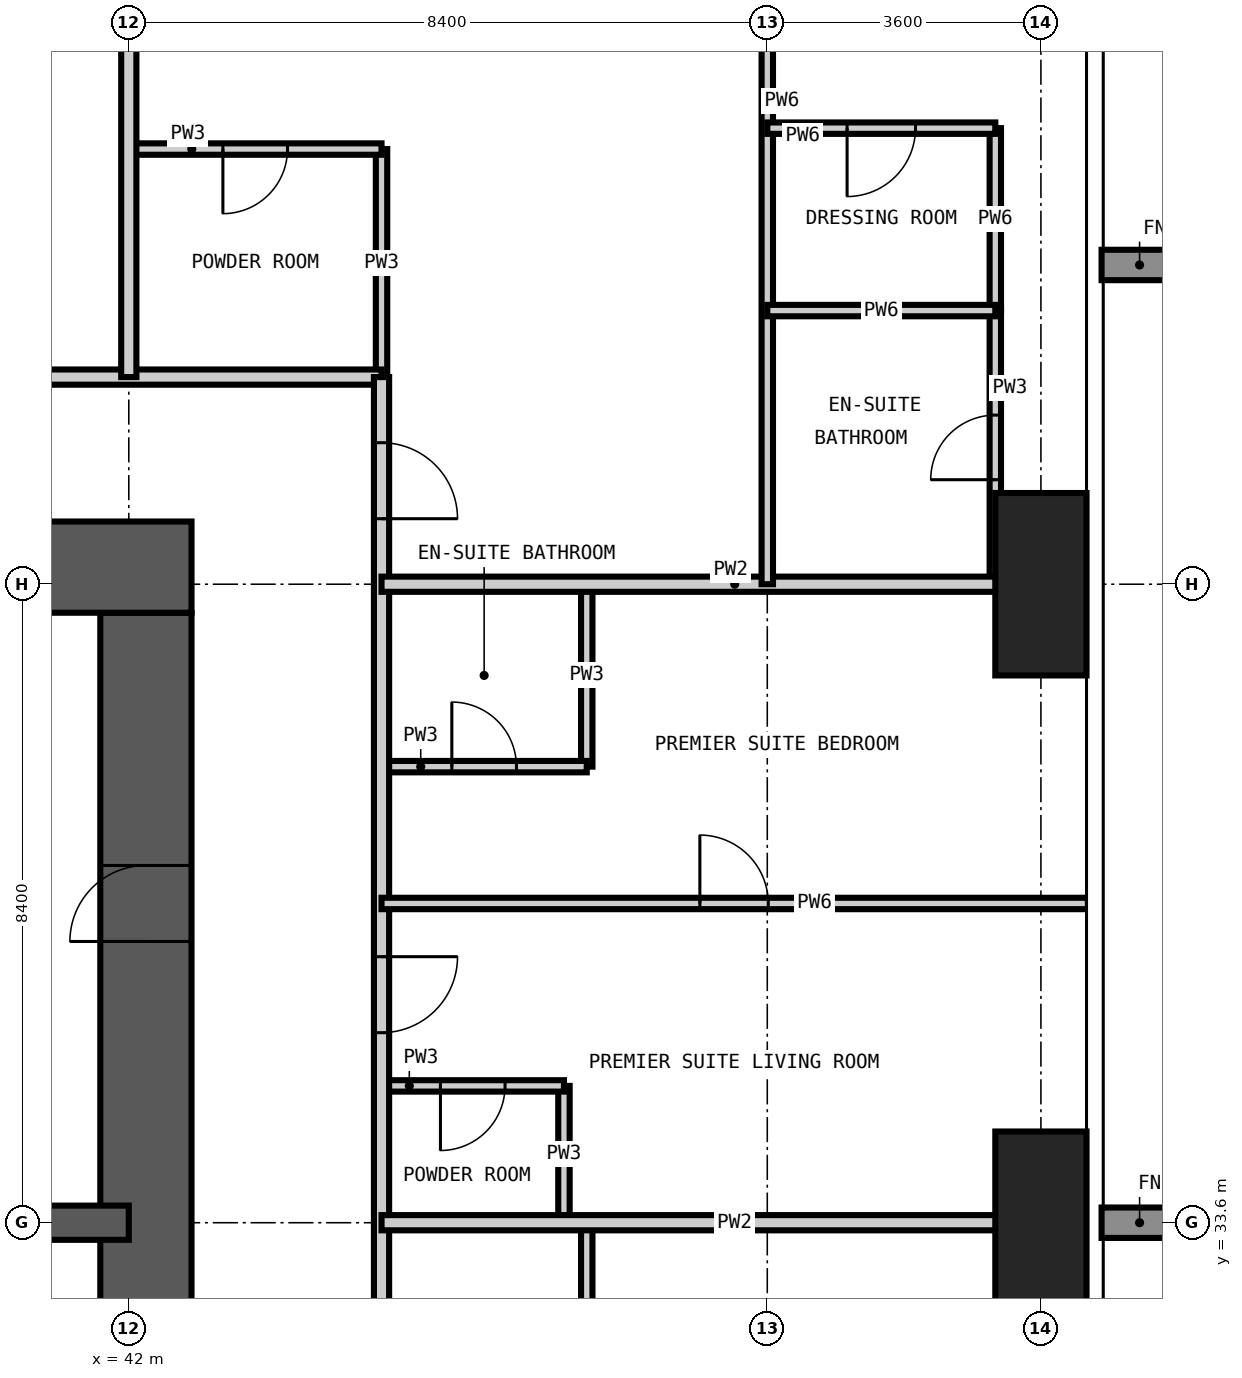
"""IFC4 building model, lengths in metres.
Left out: names, types, materials, properties, quantities, classifications, styles, units other than length and angle.
Written with IfcOpenShell. Run it as: python <this file> out.ifc"""

import sys

from ifc_helpers import new_model, si_unit, direction, frame, frame_2d, origin, origin_2d, place, context, subcontext, project, spatial, rectangle, extrude, element, fill, save


model = new_model("IFC4")
c1 = context("Model", 3, precision=1e-05, world=origin(), true_north=direction((0.0, 1.0)))
c2 = subcontext(c1, "Body", "Model", "MODEL_VIEW")
j1 = project(units=[si_unit("LENGTHUNIT", "METRE"), si_unit("PLANEANGLEUNIT", "RADIAN")], contexts=[c1])
p1 = place(None, origin())
s1 = spatial("IfcSite", under=j1, at=p1, CompositionType="ELEMENT")
p2 = place(p1, origin())
s2 = spatial("IfcBuilding", under=s1, at=p2, CompositionType="ELEMENT")
p3 = place(p2, frame((0.0, 0.0, 111.6)))
s3 = spatial("IfcBuildingStorey", under=s2, at=p3, CompositionType="ELEMENT", Elevation=111.6)
for number, where, z_axis, x_axis in (
    (1, (54.0, 33.6, -0.35), (0.0, 0.0, 1.0), (1.0, 0.0, 0.0)),
    (2, (54.0, 42.0, -0.35), (0.0, 0.0, 1.0), (1.0, 0.0, 0.0)),
):
    element("IfcColumn", number, at=place(p3, frame(where, z_axis=z_axis, x_axis=x_axis)), inside=s3, PredefinedType="COLUMN", context=c2, shape_type="SweptSolid", body=[
        extrude(rectangle(XDim=1.2, YDim=2.4, at=origin_2d()), origin(), (0.0, 0.0, 1.0), 3.6),
    ])
p4 = place(p3, frame((42.225, 17.175, -0.35), z_axis=(0.0, 0.0, 1.0), x_axis=(0.0, 1.0, 0.0)))
e3 = element("IfcWall", 3, at=p4, inside=s3, PredefinedType="SHEAR", context=c2, shape_type="SweptSolid", body=[
    extrude(rectangle(XDim=24.45, YDim=1.2, at=frame_2d((12.225, 0.0))), origin(), (0.0, 0.0, 1.0), 3.6),
])
p5 = place(p4, frame((0.425, 0.0, 0.35)))
e4 = element("IfcOpeningElement", 4, at=p5, cuts=e3, PredefinedType="OPENING", context=c2, shape_type="SweptSolid", body=[
    extrude(rectangle(XDim=1.2, YDim=2.2, at=frame_2d((0.6, 1.1))), frame((0.0, 0.61, 0.0), z_axis=(0.0, -1.0, 0.0), x_axis=(1.0, 0.0, 0.0)), (0.0, 0.0, 1.0), 1.22),
])
p6 = place(p4, frame((11.325, 0.0, 0.35)))
e5 = element("IfcOpeningElement", 5, at=p6, cuts=e3, PredefinedType="OPENING", context=c2, shape_type="SweptSolid", body=[
    extrude(rectangle(XDim=1.8, YDim=2.2, at=frame_2d((0.9, 1.1))), frame((0.0, 0.61, 0.0), z_axis=(0.0, -1.0, 0.0), x_axis=(1.0, 0.0, 0.0)), (0.0, 0.0, 1.0), 1.22),
])
p7 = place(p4, frame((20.125, 0.0, 0.35)))
e6 = element("IfcOpeningElement", 6, at=p7, cuts=e3, PredefinedType="OPENING", context=c2, shape_type="SweptSolid", body=[
    extrude(rectangle(XDim=1.0, YDim=2.1, at=frame_2d((0.5, 1.05))), frame((0.0, 0.61, 0.0), z_axis=(0.0, -1.0, 0.0), x_axis=(1.0, 0.0, 0.0)), (0.0, 0.0, 1.0), 1.22),
])
p8 = place(p3, frame((42.825, 42.225, -0.35), z_axis=(0.0, 0.0, 1.0), x_axis=(-1.0, 0.0, 0.0)))
e7 = element("IfcWall", 7, at=p8, inside=s3, PredefinedType="SHEAR", context=c2, shape_type="SweptSolid", body=[
    extrude(rectangle(XDim=26.85, YDim=1.2, at=frame_2d((13.425, 0.0))), origin(), (0.0, 0.0, 1.0), 3.6),
])
p9 = place(p8, frame((21.325, 0.0, 0.35)))
e8 = element("IfcOpeningElement", 8, at=p9, cuts=e7, PredefinedType="OPENING", context=c2, shape_type="SweptSolid", body=[
    extrude(rectangle(XDim=1.0, YDim=2.1, at=frame_2d((0.5, 1.05))), frame((0.0, 0.61, 0.0), z_axis=(0.0, -1.0, 0.0), x_axis=(1.0, 0.0, 0.0)), (0.0, 0.0, 1.0), 1.22),
])
p10 = place(p8, frame((10.725, 0.0, 0.35)))
e9 = element("IfcOpeningElement", 9, at=p10, cuts=e7, PredefinedType="OPENING", context=c2, shape_type="SweptSolid", body=[
    extrude(rectangle(XDim=1.2, YDim=2.2, at=frame_2d((0.6, 1.1))), frame((0.0, 0.61, 0.0), z_axis=(0.0, -1.0, 0.0), x_axis=(1.0, 0.0, 0.0)), (0.0, 0.0, 1.0), 1.22),
])
p11 = place(p3, frame((16.8, 33.6, -0.35), z_axis=(0.0, 0.0, 1.0), x_axis=(1.0, 0.0, 0.0)))
e10 = element("IfcWall", 10, at=p11, inside=s3, PredefinedType="SHEAR", context=c2, shape_type="SweptSolid", body=[
    extrude(rectangle(XDim=25.2, YDim=0.45, at=frame_2d((12.6, 0.0))), origin(), (0.0, 0.0, 1.0), 3.6),
])
p12 = place(p11, frame((22.6, 0.0, 0.35)))
e11 = element("IfcOpeningElement", 11, at=p12, cuts=e10, PredefinedType="OPENING", context=c2, shape_type="SweptSolid", body=[
    extrude(rectangle(XDim=1.0, YDim=2.1, at=frame_2d((0.5, 1.05))), frame((0.0, 0.235, 0.0), z_axis=(0.0, -1.0, 0.0), x_axis=(1.0, 0.0, 0.0)), (0.0, 0.0, 1.0), 0.47),
])
p13 = place(p3, frame((45.325, 44.725, 0.0), z_axis=(0.0, 0.0, 1.0), x_axis=(0.0, 1.0, 0.0)))
e12 = element("IfcWall", 12, at=p13, inside=s3, PredefinedType="PARTITIONING", context=c2, shape_type="SweptSolid", body=[
    extrude(rectangle(XDim=3.0, YDim=0.15, at=frame_2d((1.5, 0.0))), origin(), (0.0, 0.0, 1.0), 3.25),
])
p14 = place(p3, frame((47.725, 33.6, 0.0), z_axis=(0.0, 0.0, 1.0), x_axis=(0.0, 1.0, 0.0)))
e13 = element("IfcWall", 13, at=p14, inside=s3, PredefinedType="PARTITIONING", context=c2, shape_type="SweptSolid", body=[
    extrude(rectangle(XDim=1.8, YDim=0.15, at=frame_2d((0.9, 0.0))), origin(), (0.0, 0.0, 1.0), 3.25),
])
p15 = place(p3, frame((48.025, 31.2, 0.0), z_axis=(0.0, 0.0, 1.0), x_axis=(0.0, 1.0, 0.0)))
e14 = element("IfcWall", 14, at=p15, inside=s3, PredefinedType="PARTITIONING", context=c2, shape_type="SweptSolid", body=[
    extrude(rectangle(XDim=2.4, YDim=0.15, at=frame_2d((1.2, 0.0))), origin(), (0.0, 0.0, 1.0), 3.25),
])
p16 = place(p3, frame((48.025, 39.6, 0.0), z_axis=(0.0, 0.0, 1.0), x_axis=(0.0, 1.0, 0.0)))
e15 = element("IfcWall", 15, at=p16, inside=s3, PredefinedType="PARTITIONING", context=c2, shape_type="SweptSolid", body=[
    extrude(rectangle(XDim=2.4, YDim=0.15, at=frame_2d((1.2, 0.0))), origin(), (0.0, 0.0, 1.0), 3.25),
])
p17 = place(p3, frame((53.4, 42.0, 0.0), z_axis=(0.0, 0.0, 1.0), x_axis=(0.0, 1.0, 0.0)))
e16 = element("IfcWall", 16, at=p17, inside=s3, PredefinedType="PARTITIONING", context=c2, shape_type="SweptSolid", body=[
    extrude(rectangle(XDim=3.6, YDim=0.15, at=frame_2d((1.8, 0.0))), origin(), (0.0, 0.0, 1.0), 3.25),
])
p18 = place(p17, frame((1.375, 0.0, 0.0)))
e17 = element("IfcOpeningElement", 17, at=p18, cuts=e16, PredefinedType="OPENING", context=c2, shape_type="SweptSolid", body=[
    extrude(rectangle(XDim=0.85, YDim=2.1, at=frame_2d((0.425, 1.05))), frame((0.0, 0.085, 0.0), z_axis=(0.0, -1.0, 0.0), x_axis=(1.0, 0.0, 0.0)), (0.0, 0.0, 1.0), 0.17),
])
p19 = place(p3, frame((45.325, 35.4, 0.0), z_axis=(0.0, 0.0, 1.0), x_axis=(1.0, 0.0, 0.0)))
e18 = element("IfcWall", 18, at=p19, inside=s3, PredefinedType="PARTITIONING", context=c2, shape_type="SweptSolid", body=[
    extrude(rectangle(XDim=2.4, YDim=0.15, at=frame_2d((1.2, 0.0))), origin(), (0.0, 0.0, 1.0), 3.25),
])
p20 = place(p19, frame((0.775, 0.0, 0.0)))
e19 = element("IfcOpeningElement", 19, at=p20, cuts=e18, PredefinedType="OPENING", context=c2, shape_type="SweptSolid", body=[
    extrude(rectangle(XDim=0.85, YDim=2.1, at=frame_2d((0.425, 1.05))), frame((0.0, 0.085, 0.0), z_axis=(0.0, -1.0, 0.0), x_axis=(1.0, 0.0, 0.0)), (0.0, 0.0, 1.0), 0.17),
])
p21 = place(p3, frame((45.325, 39.6, 0.0), z_axis=(0.0, 0.0, 1.0), x_axis=(1.0, 0.0, 0.0)))
e20 = element("IfcWall", 20, at=p21, inside=s3, PredefinedType="PARTITIONING", context=c2, shape_type="SweptSolid", body=[
    extrude(rectangle(XDim=2.7, YDim=0.15, at=frame_2d((1.35, 0.0))), origin(), (0.0, 0.0, 1.0), 3.25),
])
p22 = place(p21, frame((0.925, 0.0, 0.0)))
e21 = element("IfcOpeningElement", 21, at=p22, cuts=e20, PredefinedType="OPENING", context=c2, shape_type="SweptSolid", body=[
    extrude(rectangle(XDim=0.85, YDim=2.1, at=frame_2d((0.425, 1.05))), frame((0.0, 0.085, 0.0), z_axis=(0.0, -1.0, 0.0), x_axis=(1.0, 0.0, 0.0)), (0.0, 0.0, 1.0), 0.17),
])
p23 = place(p3, frame((42.0, 47.725, 0.0), z_axis=(0.0, 0.0, 1.0), x_axis=(1.0, 0.0, 0.0)))
e22 = element("IfcWall", 22, at=p23, inside=s3, PredefinedType="PARTITIONING", context=c2, shape_type="SweptSolid", body=[
    extrude(rectangle(XDim=3.325, YDim=0.15, at=frame_2d((1.663, 0.0))), origin(), (0.0, 0.0, 1.0), 3.25),
])
p24 = place(p23, frame((1.238, 0.0, 0.0)))
e23 = element("IfcOpeningElement", 23, at=p24, cuts=e22, PredefinedType="OPENING", context=c2, shape_type="SweptSolid", body=[
    extrude(rectangle(XDim=0.85, YDim=2.1, at=frame_2d((0.425, 1.05))), frame((0.0, 0.085, 0.0), z_axis=(0.0, -1.0, 0.0), x_axis=(1.0, 0.0, 0.0)), (0.0, 0.0, 1.0), 0.17),
])
p25 = place(p3, frame((12.6, 44.725, 0.0), z_axis=(0.0, 0.0, 1.0), x_axis=(1.0, 0.0, 0.0)))
e24 = element("IfcWall", 24, at=p25, inside=s3, PredefinedType="PARTITIONING", context=c2, shape_type="SweptSolid", body=[
    extrude(rectangle(XDim=32.725, YDim=0.2, at=frame_2d((16.362, 0.0))), origin(), (0.0, 0.0, 1.0), 3.25),
])
p26 = place(p25, frame((9.1, 0.0, 0.0)))
e25 = element("IfcOpeningElement", 25, at=p26, cuts=e24, PredefinedType="OPENING", context=c2, shape_type="SweptSolid", body=[
    extrude(rectangle(XDim=1.0, YDim=2.2, at=frame_2d((0.5, 1.1))), frame((0.0, 0.11, 0.0), z_axis=(0.0, -1.0, 0.0), x_axis=(1.0, 0.0, 0.0)), (0.0, 0.0, 1.0), 0.22),
])
p27 = place(p25, frame((17.5, 0.0, 0.0)))
e26 = element("IfcOpeningElement", 26, at=p27, cuts=e24, PredefinedType="OPENING", context=c2, shape_type="SweptSolid", body=[
    extrude(rectangle(XDim=1.0, YDim=2.2, at=frame_2d((0.5, 1.1))), frame((0.0, 0.11, 0.0), z_axis=(0.0, -1.0, 0.0), x_axis=(1.0, 0.0, 0.0)), (0.0, 0.0, 1.0), 0.22),
])
p28 = place(p25, frame((25.9, 0.0, 0.0)))
e27 = element("IfcOpeningElement", 27, at=p28, cuts=e24, PredefinedType="OPENING", context=c2, shape_type="SweptSolid", body=[
    extrude(rectangle(XDim=1.0, YDim=2.2, at=frame_2d((0.5, 1.1))), frame((0.0, 0.11, 0.0), z_axis=(0.0, -1.0, 0.0), x_axis=(1.0, 0.0, 0.0)), (0.0, 0.0, 1.0), 0.22),
])
p29 = place(p3, frame((45.325, 44.725, 0.0), z_axis=(0.0, 0.0, 1.0), x_axis=(0.0, -1.0, 0.0)))
e28 = element("IfcWall", 28, at=p29, inside=s3, PredefinedType="PARTITIONING", context=c2, shape_type="SweptSolid", body=[
    extrude(rectangle(XDim=31.85, YDim=0.2, at=frame_2d((15.925, 0.0))), origin(), (0.0, 0.0, 1.0), 3.25),
])
p30 = place(p29, frame((24.425, 0.0, 0.0)))
e29 = element("IfcOpeningElement", 29, at=p30, cuts=e28, PredefinedType="OPENING", context=c2, shape_type="SweptSolid", body=[
    extrude(rectangle(XDim=1.0, YDim=2.2, at=frame_2d((0.5, 1.1))), frame((0.0, 0.11, 0.0), z_axis=(0.0, -1.0, 0.0), x_axis=(1.0, 0.0, 0.0)), (0.0, 0.0, 1.0), 0.22),
])
p31 = place(p29, frame((16.025, 0.0, 0.0)))
e30 = element("IfcOpeningElement", 30, at=p31, cuts=e28, PredefinedType="OPENING", context=c2, shape_type="SweptSolid", body=[
    extrude(rectangle(XDim=1.0, YDim=2.2, at=frame_2d((0.5, 1.1))), frame((0.0, 0.11, 0.0), z_axis=(0.0, -1.0, 0.0), x_axis=(1.0, 0.0, 0.0)), (0.0, 0.0, 1.0), 0.22),
])
p32 = place(p29, frame((7.625, 0.0, 0.0)))
e31 = element("IfcOpeningElement", 31, at=p32, cuts=e28, PredefinedType="OPENING", context=c2, shape_type="SweptSolid", body=[
    extrude(rectangle(XDim=1.0, YDim=2.2, at=frame_2d((0.5, 1.1))), frame((0.0, 0.11, 0.0), z_axis=(0.0, -1.0, 0.0), x_axis=(1.0, 0.0, 0.0)), (0.0, 0.0, 1.0), 0.22),
])
p33 = place(p29, frame((29.387, 0.0, 0.0)))
e32 = element("IfcOpeningElement", 32, at=p33, cuts=e28, PredefinedType="OPENING", context=c2, shape_type="SweptSolid", body=[
    extrude(rectangle(XDim=1.0, YDim=2.2, at=frame_2d((0.5, 1.1))), frame((0.0, 0.11, 0.0), z_axis=(0.0, -1.0, 0.0), x_axis=(1.0, 0.0, 0.0)), (0.0, 0.0, 1.0), 0.22),
])
p34 = place(p29, frame((0.863, 0.0, 0.0)))
e33 = element("IfcOpeningElement", 33, at=p34, cuts=e28, PredefinedType="OPENING", context=c2, shape_type="SweptSolid", body=[
    extrude(rectangle(XDim=1.0, YDim=2.2, at=frame_2d((0.5, 1.1))), frame((0.0, 0.11, 0.0), z_axis=(0.0, -1.0, 0.0), x_axis=(1.0, 0.0, 0.0)), (0.0, 0.0, 1.0), 0.22),
])
p35 = place(p3, frame((42.0, 44.725, 0.0), z_axis=(0.0, 0.0, 1.0), x_axis=(0.0, 1.0, 0.0)))
e34 = element("IfcWall", 34, at=p35, inside=s3, PredefinedType="PARTITIONING", context=c2, shape_type="SweptSolid", body=[
    extrude(rectangle(XDim=9.893, YDim=0.2, at=frame_2d((4.946, 0.0))), origin(), (0.0, 0.0, 1.0), 3.25),
])
for number, where, z_axis, x_axis in (
    (35, (45.325, 33.6, 0.0), (0.0, 0.0, 1.0), (1.0, 0.0, 0.0)),
    (36, (45.325, 42.0, 0.0), (0.0, 0.0, 1.0), (1.0, 0.0, 0.0)),
):
    element("IfcWall", number, at=place(p3, frame(where, z_axis=z_axis, x_axis=x_axis)), inside=s3, PredefinedType="PARTITIONING", context=c2, shape_type="SweptSolid", body=[
        extrude(rectangle(XDim=9.293, YDim=0.2, at=frame_2d((4.646, 0.0))), origin(), (0.0, 0.0, 1.0), 3.25),
    ])
p36 = place(p3, frame((50.4, 42.0, 0.0), z_axis=(0.0, 0.0, 1.0), x_axis=(0.0, 1.0, 0.0)))
e37 = element("IfcWall", 37, at=p36, inside=s3, PredefinedType="PARTITIONING", context=c2, shape_type="SweptSolid", body=[
    extrude(rectangle(XDim=12.618, YDim=0.15, at=frame_2d((6.309, 0.0))), origin(), (0.0, 0.0, 1.0), 3.25),
])
p37 = place(p36, frame((8.85, 0.0, 0.0)))
e38 = element("IfcOpeningElement", 38, at=p37, cuts=e37, PredefinedType="OPENING", context=c2, shape_type="SweptSolid", body=[
    extrude(rectangle(XDim=0.9, YDim=2.1, at=frame_2d((0.45, 1.05))), frame((0.0, 0.085, 0.0), z_axis=(0.0, -1.0, 0.0), x_axis=(1.0, 0.0, 0.0)), (0.0, 0.0, 1.0), 0.17),
])
p38 = place(p3, frame((53.4, 45.6, 0.0), z_axis=(0.0, 0.0, 1.0), x_axis=(0.0, 1.0, 0.0)))
e39 = element("IfcWall", 39, at=p38, inside=s3, PredefinedType="PARTITIONING", context=c2, shape_type="SweptSolid", body=[
    extrude(rectangle(XDim=2.4, YDim=0.15, at=frame_2d((1.2, 0.0))), origin(), (0.0, 0.0, 1.0), 3.25),
])
p39 = place(p3, frame((45.325, 37.8, 0.0), z_axis=(0.0, 0.0, 1.0), x_axis=(1.0, 0.0, 0.0)))
e40 = element("IfcWall", 40, at=p39, inside=s3, PredefinedType="PARTITIONING", context=c2, shape_type="SweptSolid", body=[
    extrude(rectangle(XDim=9.293, YDim=0.15, at=frame_2d((4.646, 0.0))), origin(), (0.0, 0.0, 1.0), 3.25),
])
p40 = place(p39, frame((4.188, 0.0, 0.0)))
e41 = element("IfcOpeningElement", 41, at=p40, cuts=e40, PredefinedType="OPENING", context=c2, shape_type="SweptSolid", body=[
    extrude(rectangle(XDim=0.9, YDim=2.1, at=frame_2d((0.45, 1.05))), frame((0.0, 0.085, 0.0), z_axis=(0.0, -1.0, 0.0), x_axis=(1.0, 0.0, 0.0)), (0.0, 0.0, 1.0), 0.17),
])
p41 = place(p3, frame((50.4, 45.6, 0.0), z_axis=(0.0, 0.0, 1.0), x_axis=(1.0, 0.0, 0.0)))
e42 = element("IfcWall", 42, at=p41, inside=s3, PredefinedType="PARTITIONING", context=c2, shape_type="SweptSolid", body=[
    extrude(rectangle(XDim=3.0, YDim=0.15, at=frame_2d((1.5, 0.0))), origin(), (0.0, 0.0, 1.0), 3.25),
])
p42 = place(p3, frame((50.4, 48.0, 0.0), z_axis=(0.0, 0.0, 1.0), x_axis=(1.0, 0.0, 0.0)))
e43 = element("IfcWall", 43, at=p42, inside=s3, PredefinedType="PARTITIONING", context=c2, shape_type="SweptSolid", body=[
    extrude(rectangle(XDim=3.0, YDim=0.15, at=frame_2d((1.5, 0.0))), origin(), (0.0, 0.0, 1.0), 3.25),
])
p43 = place(p42, frame((1.05, 0.0, 0.0)))
e44 = element("IfcOpeningElement", 44, at=p43, cuts=e43, PredefinedType="OPENING", context=c2, shape_type="SweptSolid", body=[
    extrude(rectangle(XDim=0.9, YDim=2.1, at=frame_2d((0.45, 1.05))), frame((0.0, 0.085, 0.0), z_axis=(0.0, -1.0, 0.0), x_axis=(1.0, 0.0, 0.0)), (0.0, 0.0, 1.0), 0.17),
])
p44 = place(p32, origin())
e45 = element("IfcDoor", 45, at=p44, inside=s3, OperationType="SINGLE_SWING_LEFT", PredefinedType="DOOR", context=c2, shape_type="SweptSolid", body=[
    extrude(rectangle(XDim=1.0, YDim=2.2, at=frame_2d((0.5, 1.1))), frame((0.0, 0.025, 0.0), z_axis=(0.0, -1.0, 0.0), x_axis=(1.0, 0.0, 0.0)), (0.0, 0.0, 1.0), 0.05),
])
fill(e31, e45)
p45 = place(p20, frame((0.85, 0.0, 0.0), z_axis=(0.0, 0.0, 1.0), x_axis=(-1.0, 0.0, 0.0)))
e46 = element("IfcDoor", 46, at=p45, inside=s3, OperationType="SINGLE_SWING_RIGHT", PredefinedType="DOOR", context=c2, shape_type="SweptSolid", body=[
    extrude(rectangle(XDim=0.85, YDim=2.1, at=frame_2d((0.425, 1.05))), frame((0.0, 0.025, 0.0), z_axis=(0.0, -1.0, 0.0), x_axis=(1.0, 0.0, 0.0)), (0.0, 0.0, 1.0), 0.05),
])
fill(e19, e46)
p46 = place(p40, origin())
e47 = element("IfcDoor", 47, at=p46, inside=s3, OperationType="SINGLE_SWING_LEFT", PredefinedType="DOOR", context=c2, shape_type="SweptSolid", body=[
    extrude(rectangle(XDim=0.9, YDim=2.1, at=frame_2d((0.45, 1.05))), frame((0.0, 0.025, 0.0), z_axis=(0.0, -1.0, 0.0), x_axis=(1.0, 0.0, 0.0)), (0.0, 0.0, 1.0), 0.05),
])
fill(e41, e47)
p47 = place(p22, origin())
e48 = element("IfcDoor", 48, at=p47, inside=s3, OperationType="SINGLE_SWING_LEFT", PredefinedType="DOOR", context=c2, shape_type="SweptSolid", body=[
    extrude(rectangle(XDim=0.85, YDim=2.1, at=frame_2d((0.425, 1.05))), frame((0.0, 0.025, 0.0), z_axis=(0.0, -1.0, 0.0), x_axis=(1.0, 0.0, 0.0)), (0.0, 0.0, 1.0), 0.05),
])
fill(e21, e48)
p48 = place(p34, origin())
e49 = element("IfcDoor", 49, at=p48, inside=s3, OperationType="SINGLE_SWING_RIGHT", PredefinedType="DOOR", context=c2, shape_type="SweptSolid", body=[
    extrude(rectangle(XDim=1.0, YDim=2.2, at=frame_2d((0.5, 1.1))), frame((0.0, 0.025, 0.0), z_axis=(0.0, -1.0, 0.0), x_axis=(1.0, 0.0, 0.0)), (0.0, 0.0, 1.0), 0.05),
])
fill(e33, e49)
p49 = place(p24, frame((0.85, 0.0, 0.0), z_axis=(0.0, 0.0, 1.0), x_axis=(-1.0, 0.0, 0.0)))
e50 = element("IfcDoor", 50, at=p49, inside=s3, OperationType="SINGLE_SWING_RIGHT", PredefinedType="DOOR", context=c2, shape_type="SweptSolid", body=[
    extrude(rectangle(XDim=0.85, YDim=2.1, at=frame_2d((0.425, 1.05))), frame((0.0, 0.025, 0.0), z_axis=(0.0, -1.0, 0.0), x_axis=(1.0, 0.0, 0.0)), (0.0, 0.0, 1.0), 0.05),
])
fill(e23, e50)
p50 = place(p18, origin())
e51 = element("IfcDoor", 51, at=p50, inside=s3, OperationType="SINGLE_SWING_LEFT", PredefinedType="DOOR", context=c2, shape_type="SweptSolid", body=[
    extrude(rectangle(XDim=0.85, YDim=2.1, at=frame_2d((0.425, 1.05))), frame((0.0, 0.025, 0.0), z_axis=(0.0, -1.0, 0.0), x_axis=(1.0, 0.0, 0.0)), (0.0, 0.0, 1.0), 0.05),
])
fill(e17, e51)
p51 = place(p43, frame((0.9, 0.0, 0.0), z_axis=(0.0, 0.0, 1.0), x_axis=(-1.0, 0.0, 0.0)))
e52 = element("IfcDoor", 52, at=p51, inside=s3, OperationType="SINGLE_SWING_RIGHT", PredefinedType="DOOR", context=c2, shape_type="SweptSolid", body=[
    extrude(rectangle(XDim=0.9, YDim=2.1, at=frame_2d((0.45, 1.05))), frame((0.0, 0.025, 0.0), z_axis=(0.0, -1.0, 0.0), x_axis=(1.0, 0.0, 0.0)), (0.0, 0.0, 1.0), 0.05),
])
fill(e44, e52)
p52 = place(p7, origin())
e53 = element("IfcDoor", 53, at=p52, inside=s3, OperationType="SINGLE_SWING_LEFT", PredefinedType="DOOR", context=c2, shape_type="SweptSolid", body=[
    extrude(rectangle(XDim=1.0, YDim=2.1, at=frame_2d((0.5, 1.05))), frame((0.0, 0.025, 0.0), z_axis=(0.0, -1.0, 0.0), x_axis=(1.0, 0.0, 0.0)), (0.0, 0.0, 1.0), 0.05),
])
fill(e6, e53)
save(model, sys.argv[1])
